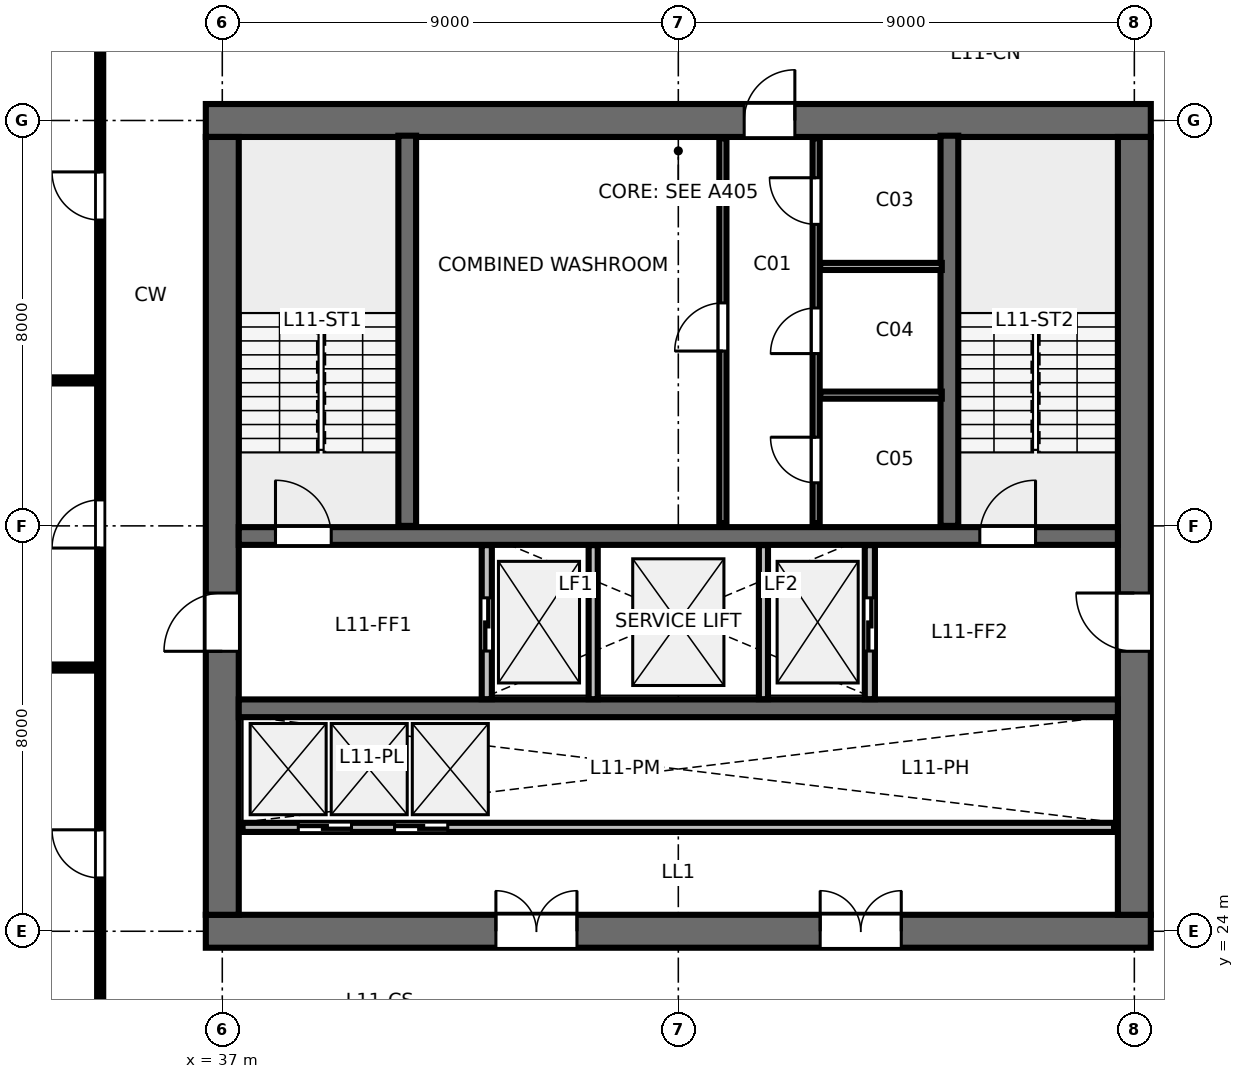
"""IFC4 building model, lengths in metres.
Left out: names, types, materials, properties, quantities, classifications, styles, units other than length and angle.
Written with IfcOpenShell. Run it as: python <this file> out.ifc"""

import sys

from ifc_helpers import new_model, si_unit, direction, frame, frame_2d, origin, place, context, subcontext, project, spatial, rectangle, extrude, element, fill, save


model = new_model("IFC4")
c1 = context("Model", 3, precision=1e-05, world=origin(), true_north=direction((0.0, 1.0)))
c2 = subcontext(c1, "Body", "Model", "MODEL_VIEW")
j1 = project(units=[si_unit("LENGTHUNIT", "METRE"), si_unit("PLANEANGLEUNIT", "RADIAN")], contexts=[c1])
p1 = place(None, origin())
s1 = spatial("IfcSite", under=j1, at=p1, CompositionType="ELEMENT")
p2 = place(p1, origin())
s2 = spatial("IfcBuilding", under=s1, at=p2, CompositionType="ELEMENT")
p3 = place(p2, frame((0.0, 0.0, 46.0)))
s3 = spatial("IfcBuildingStorey", under=s2, at=p3, CompositionType="ELEMENT", Elevation=46.0)
p4 = place(p3, frame((36.675, 24.0, 0.0), z_axis=(0.0, 0.0, 1.0), x_axis=(1.0, 0.0, 0.0)))
e1 = element("IfcWall", 1, at=p4, inside=s3, PredefinedType="SHEAR", context=c2, shape_type="SweptSolid", body=[
    extrude(rectangle(XDim=18.65, YDim=0.65, at=frame_2d((9.325, 0.0))), origin(), (0.0, 0.0, 1.0), 3.36),
])
p5 = place(p4, frame((5.725, 0.0, 0.0)))
e2 = element("IfcOpeningElement", 2, at=p5, cuts=e1, PredefinedType="OPENING", context=c2, shape_type="SweptSolid", body=[
    extrude(rectangle(XDim=1.6, YDim=2.15, at=frame_2d((0.8, 1.075))), frame((0.0, 0.335, 0.0), z_axis=(0.0, -1.0, 0.0), x_axis=(1.0, 0.0, 0.0)), (0.0, 0.0, 1.0), 0.67),
])
p6 = place(p4, frame((12.125, 0.0, 0.0)))
e3 = element("IfcOpeningElement", 3, at=p6, cuts=e1, PredefinedType="OPENING", context=c2, shape_type="SweptSolid", body=[
    extrude(rectangle(XDim=1.6, YDim=2.15, at=frame_2d((0.8, 1.075))), frame((0.0, 0.335, 0.0), z_axis=(0.0, -1.0, 0.0), x_axis=(1.0, 0.0, 0.0)), (0.0, 0.0, 1.0), 0.67),
])
p7 = place(p3, frame((36.675, 40.0, 0.0), z_axis=(0.0, 0.0, 1.0), x_axis=(1.0, 0.0, 0.0)))
e4 = element("IfcWall", 4, at=p7, inside=s3, PredefinedType="SHEAR", context=c2, shape_type="SweptSolid", body=[
    extrude(rectangle(XDim=18.65, YDim=0.65, at=frame_2d((9.325, 0.0))), origin(), (0.0, 0.0, 1.0), 3.36),
])
p8 = place(p7, frame((10.625, 0.0, 0.0)))
e5 = element("IfcOpeningElement", 5, at=p8, cuts=e4, PredefinedType="OPENING", context=c2, shape_type="SweptSolid", body=[
    extrude(rectangle(XDim=1.0, YDim=2.15, at=frame_2d((0.5, 1.075))), frame((0.0, 0.335, 0.0), z_axis=(0.0, -1.0, 0.0), x_axis=(1.0, 0.0, 0.0)), (0.0, 0.0, 1.0), 0.67),
])
p9 = place(p3, frame((37.0, 24.325, 0.0), z_axis=(0.0, 0.0, 1.0), x_axis=(0.0, 1.0, 0.0)))
e6 = element("IfcWall", 6, at=p9, inside=s3, PredefinedType="SHEAR", context=c2, shape_type="SweptSolid", body=[
    extrude(rectangle(XDim=15.35, YDim=0.65, at=frame_2d((7.675, 0.0))), origin(), (0.0, 0.0, 1.0), 3.36),
])
p10 = place(p9, frame((5.2, 0.0, 0.0)))
e7 = element("IfcOpeningElement", 7, at=p10, cuts=e6, PredefinedType="OPENING", context=c2, shape_type="SweptSolid", body=[
    extrude(rectangle(XDim=1.15, YDim=2.15, at=frame_2d((0.575, 1.075))), frame((0.0, 0.335, 0.0), z_axis=(0.0, -1.0, 0.0), x_axis=(1.0, 0.0, 0.0)), (0.0, 0.0, 1.0), 0.67),
])
p11 = place(p3, frame((55.0, 24.325, 0.0), z_axis=(0.0, 0.0, 1.0), x_axis=(0.0, 1.0, 0.0)))
e8 = element("IfcWall", 8, at=p11, inside=s3, PredefinedType="SHEAR", context=c2, shape_type="SweptSolid", body=[
    extrude(rectangle(XDim=15.35, YDim=0.65, at=frame_2d((7.675, 0.0))), origin(), (0.0, 0.0, 1.0), 3.36),
])
p12 = place(p11, frame((5.2, 0.0, 0.0)))
e9 = element("IfcOpeningElement", 9, at=p12, cuts=e8, PredefinedType="OPENING", context=c2, shape_type="SweptSolid", body=[
    extrude(rectangle(XDim=1.15, YDim=2.15, at=frame_2d((0.575, 1.075))), frame((0.0, 0.335, 0.0), z_axis=(0.0, -1.0, 0.0), x_axis=(1.0, 0.0, 0.0)), (0.0, 0.0, 1.0), 0.67),
])
p13 = place(p3, frame((37.325, 31.8, 0.0), z_axis=(0.0, 0.0, 1.0), x_axis=(1.0, 0.0, 0.0)))
e10 = element("IfcWall", 10, at=p13, inside=s3, PredefinedType="SHEAR", context=c2, shape_type="SweptSolid", body=[
    extrude(rectangle(XDim=17.35, YDim=0.35, at=frame_2d((8.675, 0.0))), origin(), (0.0, 0.0, 1.0), 3.36),
])
p14 = place(p13, frame((0.725, 0.0, 0.0)))
e11 = element("IfcOpeningElement", 11, at=p14, cuts=e10, PredefinedType="OPENING", context=c2, shape_type="SweptSolid", body=[
    extrude(rectangle(XDim=1.1, YDim=2.15, at=frame_2d((0.55, 1.075))), frame((0.0, 0.185, 0.0), z_axis=(0.0, -1.0, 0.0), x_axis=(1.0, 0.0, 0.0)), (0.0, 0.0, 1.0), 0.37),
])
p15 = place(p13, frame((14.625, 0.0, 0.0)))
e12 = element("IfcOpeningElement", 12, at=p15, cuts=e10, PredefinedType="OPENING", context=c2, shape_type="SweptSolid", body=[
    extrude(rectangle(XDim=1.1, YDim=2.15, at=frame_2d((0.55, 1.075))), frame((0.0, 0.185, 0.0), z_axis=(0.0, -1.0, 0.0), x_axis=(1.0, 0.0, 0.0)), (0.0, 0.0, 1.0), 0.37),
])
p16 = place(p3, frame((37.325, 28.4, 0.0), z_axis=(0.0, 0.0, 1.0), x_axis=(1.0, 0.0, 0.0)))
e13 = element("IfcWall", 13, at=p16, inside=s3, PredefinedType="SHEAR", context=c2, shape_type="SweptSolid", body=[
    extrude(rectangle(XDim=17.35, YDim=0.35, at=frame_2d((8.675, 0.0))), origin(), (0.0, 0.0, 1.0), 3.36),
])
for number, where, z_axis, x_axis in (
    (14, (40.65, 32.0, 0.0), (0.0, 0.0, 1.0), (0.0, 1.0, 0.0)),
    (15, (51.35, 32.0, 0.0), (0.0, 0.0, 1.0), (0.0, 1.0, 0.0)),
):
    element("IfcWall", number, at=place(p3, frame(where, z_axis=z_axis, x_axis=x_axis)), inside=s3, PredefinedType="SHEAR", context=c2, shape_type="SweptSolid", body=[
        extrude(rectangle(XDim=7.7, YDim=0.35, at=frame_2d((3.85, 0.0))), origin(), (0.0, 0.0, 1.0), 3.6),
    ])
p17 = place(p3, frame((46.88, 32.05, 0.0), z_axis=(0.0, 0.0, 1.0), x_axis=(0.0, 1.0, 0.0)))
e16 = element("IfcWall", 16, at=p17, inside=s3, PredefinedType="PARTITIONING", context=c2, shape_type="SweptSolid", body=[
    extrude(rectangle(XDim=7.6, YDim=0.14, at=frame_2d((3.8, 0.0))), origin(), (0.0, 0.0, 1.0), 3.15),
])
p18 = place(p17, frame((3.4, 0.0, 0.0)))
e17 = element("IfcOpeningElement", 17, at=p18, cuts=e16, PredefinedType="OPENING", context=c2, shape_type="SweptSolid", body=[
    extrude(rectangle(XDim=0.95, YDim=2.15, at=frame_2d((0.475, 1.075))), frame((0.0, 0.08, 0.0), z_axis=(0.0, -1.0, 0.0), x_axis=(1.0, 0.0, 0.0)), (0.0, 0.0, 1.0), 0.16),
])
p19 = place(p3, frame((48.72, 32.05, 0.0), z_axis=(0.0, 0.0, 1.0), x_axis=(0.0, 1.0, 0.0)))
e18 = element("IfcWall", 18, at=p19, inside=s3, PredefinedType="PARTITIONING", context=c2, shape_type="SweptSolid", body=[
    extrude(rectangle(XDim=7.6, YDim=0.14, at=frame_2d((3.8, 0.0))), origin(), (0.0, 0.0, 1.0), 3.15),
])
p20 = place(p19, frame((0.8, 0.0, 0.0)))
e19 = element("IfcOpeningElement", 19, at=p20, cuts=e18, PredefinedType="OPENING", context=c2, shape_type="SweptSolid", body=[
    extrude(rectangle(XDim=0.9, YDim=2.15, at=frame_2d((0.45, 1.075))), frame((0.0, 0.08, 0.0), z_axis=(0.0, -1.0, 0.0), x_axis=(1.0, 0.0, 0.0)), (0.0, 0.0, 1.0), 0.16),
])
p21 = place(p19, frame((3.35, 0.0, 0.0)))
e20 = element("IfcOpeningElement", 20, at=p21, cuts=e18, PredefinedType="OPENING", context=c2, shape_type="SweptSolid", body=[
    extrude(rectangle(XDim=0.9, YDim=2.15, at=frame_2d((0.45, 1.075))), frame((0.0, 0.08, 0.0), z_axis=(0.0, -1.0, 0.0), x_axis=(1.0, 0.0, 0.0)), (0.0, 0.0, 1.0), 0.16),
])
p22 = place(p19, frame((5.9, 0.0, 0.0)))
e21 = element("IfcOpeningElement", 21, at=p22, cuts=e18, PredefinedType="OPENING", context=c2, shape_type="SweptSolid", body=[
    extrude(rectangle(XDim=0.92, YDim=2.15, at=frame_2d((0.46, 1.075))), frame((0.0, 0.08, 0.0), z_axis=(0.0, -1.0, 0.0), x_axis=(1.0, 0.0, 0.0)), (0.0, 0.0, 1.0), 0.16),
])
for number, where, z_axis, x_axis in (
    (22, (48.8, 34.58, 0.0), (0.0, 0.0, 1.0), (1.0, 0.0, 0.0)),
    (23, (48.8, 37.12, 0.0), (0.0, 0.0, 1.0), (1.0, 0.0, 0.0)),
):
    element("IfcWall", number, at=place(p3, frame(where, z_axis=z_axis, x_axis=x_axis)), inside=s3, PredefinedType="PARTITIONING", context=c2, shape_type="SweptSolid", body=[
        extrude(rectangle(XDim=2.4, YDim=0.14, at=frame_2d((1.2, 0.0))), origin(), (0.0, 0.0, 1.0), 3.15),
    ])
p23 = place(p3, frame((42.22, 28.58, 0.0), z_axis=(0.0, 0.0, 1.0), x_axis=(0.0, 1.0, 0.0)))
e24 = element("IfcWall", 24, at=p23, inside=s3, PredefinedType="PARTITIONING", context=c2, shape_type="SweptSolid", body=[
    extrude(rectangle(XDim=3.04, YDim=0.2, at=frame_2d((1.52, 0.0))), origin(), (0.0, 0.0, 1.0), 3.15),
])
p24 = place(p23, frame((0.95, 0.0, 0.0)))
e25 = element("IfcOpeningElement", 25, at=p24, cuts=e24, PredefinedType="OPENING", context=c2, shape_type="SweptSolid", body=[
    extrude(rectangle(XDim=1.05, YDim=2.15, at=frame_2d((0.525, 1.075))), frame((0.0, 0.11, 0.0), z_axis=(0.0, -1.0, 0.0), x_axis=(1.0, 0.0, 0.0)), (0.0, 0.0, 1.0), 0.22),
])
p25 = place(p3, frame((49.78, 28.58, 0.0), z_axis=(0.0, 0.0, 1.0), x_axis=(0.0, 1.0, 0.0)))
e26 = element("IfcWall", 26, at=p25, inside=s3, PredefinedType="PARTITIONING", context=c2, shape_type="SweptSolid", body=[
    extrude(rectangle(XDim=3.04, YDim=0.2, at=frame_2d((1.52, 0.0))), origin(), (0.0, 0.0, 1.0), 3.15),
])
p26 = place(p25, frame((0.95, 0.0, 0.0)))
e27 = element("IfcOpeningElement", 27, at=p26, cuts=e26, PredefinedType="OPENING", context=c2, shape_type="SweptSolid", body=[
    extrude(rectangle(XDim=1.05, YDim=2.15, at=frame_2d((0.525, 1.075))), frame((0.0, 0.11, 0.0), z_axis=(0.0, -1.0, 0.0), x_axis=(1.0, 0.0, 0.0)), (0.0, 0.0, 1.0), 0.22),
])
for number, where, z_axis, x_axis in (
    (28, (44.32, 28.58, 0.0), (0.0, 0.0, 1.0), (0.0, 1.0, 0.0)),
    (29, (47.68, 28.58, 0.0), (0.0, 0.0, 1.0), (0.0, 1.0, 0.0)),
):
    element("IfcWall", number, at=place(p3, frame(where, z_axis=z_axis, x_axis=x_axis)), inside=s3, PredefinedType="PARTITIONING", context=c2, shape_type="SweptSolid", body=[
        extrude(rectangle(XDim=3.04, YDim=0.18, at=frame_2d((1.52, 0.0))), origin(), (0.0, 0.0, 1.0), 3.15),
    ])
p27 = place(p3, frame((37.4, 26.05, 0.0), z_axis=(0.0, 0.0, 1.0), x_axis=(1.0, 0.0, 0.0)))
e30 = element("IfcWall", 30, at=p27, inside=s3, PredefinedType="PARTITIONING", context=c2, shape_type="SweptSolid", body=[
    extrude(rectangle(XDim=17.2, YDim=0.18, at=frame_2d((8.6, 0.0))), origin(), (0.0, 0.0, 1.0), 3.15),
])
p28 = place(p27, frame((1.1, 0.0, 0.0)))
e31 = element("IfcOpeningElement", 31, at=p28, cuts=e30, PredefinedType="OPENING", context=c2, shape_type="SweptSolid", body=[
    extrude(rectangle(XDim=1.05, YDim=2.15, at=frame_2d((0.525, 1.075))), frame((0.0, 0.1, 0.0), z_axis=(0.0, -1.0, 0.0), x_axis=(1.0, 0.0, 0.0)), (0.0, 0.0, 1.0), 0.2),
])
p29 = place(p27, frame((3.0, 0.0, 0.0)))
e32 = element("IfcOpeningElement", 32, at=p29, cuts=e30, PredefinedType="OPENING", context=c2, shape_type="SweptSolid", body=[
    extrude(rectangle(XDim=1.05, YDim=2.15, at=frame_2d((0.525, 1.075))), frame((0.0, 0.1, 0.0), z_axis=(0.0, -1.0, 0.0), x_axis=(1.0, 0.0, 0.0)), (0.0, 0.0, 1.0), 0.2),
])
p30 = place(p3, frame((34.59, 29.204, 0.0), z_axis=(0.0, 0.0, 1.0), x_axis=(-1.0, 0.0, 0.0)))
e33 = element("IfcWall", 33, at=p30, inside=s3, PredefinedType="PARTITIONING", context=c2, shape_type="SweptSolid", body=[
    extrude(rectangle(XDim=12.36, YDim=0.12, at=frame_2d((6.18, 0.0))), origin(), (0.0, 0.0, 1.0), 2.43),
])
p31 = place(p30, frame((1.4, 0.0, 0.0)))
e34 = element("IfcOpeningElement", 34, at=p31, cuts=e33, PredefinedType="OPENING", context=c2, shape_type="SweptSolid", body=[
    extrude(rectangle(XDim=0.9, YDim=2.15, at=frame_2d((0.45, 1.075))), frame((0.0, 0.07, 0.0), z_axis=(0.0, -1.0, 0.0), x_axis=(1.0, 0.0, 0.0)), (0.0, 0.0, 1.0), 0.14),
])
p32 = place(p3, frame((34.59, 34.871, 0.0), z_axis=(0.0, 0.0, 1.0), x_axis=(-1.0, 0.0, 0.0)))
e35 = element("IfcWall", 35, at=p32, inside=s3, PredefinedType="PARTITIONING", context=c2, shape_type="SweptSolid", body=[
    extrude(rectangle(XDim=12.36, YDim=0.12, at=frame_2d((6.18, 0.0))), origin(), (0.0, 0.0, 1.0), 2.43),
])
p33 = place(p32, frame((1.4, 0.0, 0.0)))
e36 = element("IfcOpeningElement", 36, at=p33, cuts=e35, PredefinedType="OPENING", context=c2, shape_type="SweptSolid", body=[
    extrude(rectangle(XDim=0.9, YDim=2.15, at=frame_2d((0.45, 1.075))), frame((0.0, 0.07, 0.0), z_axis=(0.0, -1.0, 0.0), x_axis=(1.0, 0.0, 0.0)), (0.0, 0.0, 1.0), 0.14),
])
p34 = place(p3, frame((34.59, 21.65, 0.0), z_axis=(0.0, 0.0, 1.0), x_axis=(0.0, 1.0, 0.0)))
e37 = element("IfcWall", 37, at=p34, inside=s3, PredefinedType="PARTITIONING", context=c2, shape_type="SweptSolid", body=[
    extrude(rectangle(XDim=20.7, YDim=0.12, at=frame_2d((10.35, 0.0))), origin(), (0.0, 0.0, 1.0), 2.43),
])
p35 = place(p34, frame((3.402, 0.0, 0.0)))
e38 = element("IfcOpeningElement", 38, at=p35, cuts=e37, PredefinedType="OPENING", context=c2, shape_type="SweptSolid", body=[
    extrude(rectangle(XDim=0.95, YDim=2.15, at=frame_2d((0.475, 1.075))), frame((0.0, 0.07, 0.0), z_axis=(0.0, -1.0, 0.0), x_axis=(1.0, 0.0, 0.0)), (0.0, 0.0, 1.0), 0.14),
])
p36 = place(p34, frame((9.912, 0.0, 0.0)))
e39 = element("IfcOpeningElement", 39, at=p36, cuts=e37, PredefinedType="OPENING", context=c2, shape_type="SweptSolid", body=[
    extrude(rectangle(XDim=0.95, YDim=2.15, at=frame_2d((0.475, 1.075))), frame((0.0, 0.07, 0.0), z_axis=(0.0, -1.0, 0.0), x_axis=(1.0, 0.0, 0.0)), (0.0, 0.0, 1.0), 0.14),
])
p37 = place(p34, frame((16.385, 0.0, 0.0)))
e40 = element("IfcOpeningElement", 40, at=p37, cuts=e37, PredefinedType="OPENING", context=c2, shape_type="SweptSolid", body=[
    extrude(rectangle(XDim=0.95, YDim=2.15, at=frame_2d((0.475, 1.075))), frame((0.0, 0.07, 0.0), z_axis=(0.0, -1.0, 0.0), x_axis=(1.0, 0.0, 0.0)), (0.0, 0.0, 1.0), 0.14),
])
p38 = place(p14, origin())
e41 = element("IfcDoor", 41, at=p38, inside=s3, OperationType="SINGLE_SWING_LEFT", PredefinedType="DOOR", context=c2, shape_type="SweptSolid", body=[
    extrude(rectangle(XDim=1.1, YDim=2.15, at=frame_2d((0.55, 1.075))), frame((0.0, 0.025, 0.0), z_axis=(0.0, -1.0, 0.0), x_axis=(1.0, 0.0, 0.0)), (0.0, 0.0, 1.0), 0.05),
])
fill(e11, e41)
p39 = place(p15, origin())
e42 = element("IfcDoor", 42, at=p39, inside=s3, OperationType="SINGLE_SWING_RIGHT", PredefinedType="DOOR", context=c2, shape_type="SweptSolid", body=[
    extrude(rectangle(XDim=1.1, YDim=2.15, at=frame_2d((0.55, 1.075))), frame((0.0, 0.025, 0.0), z_axis=(0.0, -1.0, 0.0), x_axis=(1.0, 0.0, 0.0)), (0.0, 0.0, 1.0), 0.05),
])
fill(e12, e42)
p40 = place(p8, origin())
e43 = element("IfcDoor", 43, at=p40, inside=s3, OperationType="SINGLE_SWING_RIGHT", PredefinedType="DOOR", context=c2, shape_type="SweptSolid", body=[
    extrude(rectangle(XDim=1.0, YDim=2.15, at=frame_2d((0.5, 1.075))), frame((0.0, 0.025, 0.0), z_axis=(0.0, -1.0, 0.0), x_axis=(1.0, 0.0, 0.0)), (0.0, 0.0, 1.0), 0.05),
])
fill(e5, e43)
p41 = place(p10, origin())
e44 = element("IfcDoor", 44, at=p41, inside=s3, OperationType="SINGLE_SWING_LEFT", PredefinedType="DOOR", context=c2, shape_type="SweptSolid", body=[
    extrude(rectangle(XDim=1.15, YDim=2.15, at=frame_2d((0.575, 1.075))), frame((0.0, 0.025, 0.0), z_axis=(0.0, -1.0, 0.0), x_axis=(1.0, 0.0, 0.0)), (0.0, 0.0, 1.0), 0.05),
])
fill(e7, e44)
p42 = place(p12, origin())
e45 = element("IfcDoor", 45, at=p42, inside=s3, OperationType="SINGLE_SWING_RIGHT", PredefinedType="DOOR", context=c2, shape_type="SweptSolid", body=[
    extrude(rectangle(XDim=1.15, YDim=2.15, at=frame_2d((0.575, 1.075))), frame((0.0, 0.025, 0.0), z_axis=(0.0, -1.0, 0.0), x_axis=(1.0, 0.0, 0.0)), (0.0, 0.0, 1.0), 0.05),
])
fill(e9, e45)
p43 = place(p5, origin())
e46 = element("IfcDoor", 46, at=p43, inside=s3, OperationType="DOUBLE_DOOR_SINGLE_SWING", PredefinedType="DOOR", context=c2, shape_type="SweptSolid", body=[
    extrude(rectangle(XDim=1.6, YDim=2.15, at=frame_2d((0.8, 1.075))), frame((0.0, 0.025, 0.0), z_axis=(0.0, -1.0, 0.0), x_axis=(1.0, 0.0, 0.0)), (0.0, 0.0, 1.0), 0.05),
])
fill(e2, e46)
p44 = place(p6, origin())
e47 = element("IfcDoor", 47, at=p44, inside=s3, OperationType="DOUBLE_DOOR_SINGLE_SWING", PredefinedType="DOOR", context=c2, shape_type="SweptSolid", body=[
    extrude(rectangle(XDim=1.6, YDim=2.15, at=frame_2d((0.8, 1.075))), frame((0.0, 0.025, 0.0), z_axis=(0.0, -1.0, 0.0), x_axis=(1.0, 0.0, 0.0)), (0.0, 0.0, 1.0), 0.05),
])
fill(e3, e47)
p45 = place(p18, origin())
e48 = element("IfcDoor", 48, at=p45, inside=s3, OperationType="SINGLE_SWING_LEFT", PredefinedType="DOOR", context=c2, shape_type="SweptSolid", body=[
    extrude(rectangle(XDim=0.95, YDim=2.15, at=frame_2d((0.475, 1.075))), frame((0.0, 0.025, 0.0), z_axis=(0.0, -1.0, 0.0), x_axis=(1.0, 0.0, 0.0)), (0.0, 0.0, 1.0), 0.05),
])
fill(e17, e48)
p46 = place(p20, origin())
e49 = element("IfcDoor", 49, at=p46, inside=s3, OperationType="SINGLE_SWING_RIGHT", PredefinedType="DOOR", context=c2, shape_type="SweptSolid", body=[
    extrude(rectangle(XDim=0.9, YDim=2.15, at=frame_2d((0.45, 1.075))), frame((0.0, 0.025, 0.0), z_axis=(0.0, -1.0, 0.0), x_axis=(1.0, 0.0, 0.0)), (0.0, 0.0, 1.0), 0.05),
])
fill(e19, e49)
p47 = place(p21, origin())
e50 = element("IfcDoor", 50, at=p47, inside=s3, OperationType="SINGLE_SWING_LEFT", PredefinedType="DOOR", context=c2, shape_type="SweptSolid", body=[
    extrude(rectangle(XDim=0.9, YDim=2.15, at=frame_2d((0.45, 1.075))), frame((0.0, 0.025, 0.0), z_axis=(0.0, -1.0, 0.0), x_axis=(1.0, 0.0, 0.0)), (0.0, 0.0, 1.0), 0.05),
])
fill(e20, e50)
p48 = place(p22, origin())
e51 = element("IfcDoor", 51, at=p48, inside=s3, OperationType="SINGLE_SWING_RIGHT", PredefinedType="DOOR", context=c2, shape_type="SweptSolid", body=[
    extrude(rectangle(XDim=0.92, YDim=2.15, at=frame_2d((0.46, 1.075))), frame((0.0, 0.025, 0.0), z_axis=(0.0, -1.0, 0.0), x_axis=(1.0, 0.0, 0.0)), (0.0, 0.0, 1.0), 0.05),
])
fill(e21, e51)
p49 = place(p24, origin())
e52 = element("IfcDoor", 52, at=p49, inside=s3, OperationType="SLIDING_TO_LEFT", PredefinedType="DOOR", context=c2, shape_type="SweptSolid", body=[
    extrude(rectangle(XDim=1.05, YDim=2.15, at=frame_2d((0.525, 1.075))), frame((0.0, 0.025, 0.0), z_axis=(0.0, -1.0, 0.0), x_axis=(1.0, 0.0, 0.0)), (0.0, 0.0, 1.0), 0.05),
])
fill(e25, e52)
p50 = place(p26, origin())
e53 = element("IfcDoor", 53, at=p50, inside=s3, OperationType="SLIDING_TO_RIGHT", PredefinedType="DOOR", context=c2, shape_type="SweptSolid", body=[
    extrude(rectangle(XDim=1.05, YDim=2.15, at=frame_2d((0.525, 1.075))), frame((0.0, 0.025, 0.0), z_axis=(0.0, -1.0, 0.0), x_axis=(1.0, 0.0, 0.0)), (0.0, 0.0, 1.0), 0.05),
])
fill(e27, e53)
p51 = place(p28, origin())
e54 = element("IfcDoor", 54, at=p51, inside=s3, OperationType="SLIDING_TO_LEFT", PredefinedType="DOOR", context=c2, shape_type="SweptSolid", body=[
    extrude(rectangle(XDim=1.05, YDim=2.15, at=frame_2d((0.525, 1.075))), frame((0.0, 0.025, 0.0), z_axis=(0.0, -1.0, 0.0), x_axis=(1.0, 0.0, 0.0)), (0.0, 0.0, 1.0), 0.05),
])
fill(e31, e54)
p52 = place(p29, origin())
e55 = element("IfcDoor", 55, at=p52, inside=s3, OperationType="SLIDING_TO_RIGHT", PredefinedType="DOOR", context=c2, shape_type="SweptSolid", body=[
    extrude(rectangle(XDim=1.05, YDim=2.15, at=frame_2d((0.525, 1.075))), frame((0.0, 0.025, 0.0), z_axis=(0.0, -1.0, 0.0), x_axis=(1.0, 0.0, 0.0)), (0.0, 0.0, 1.0), 0.05),
])
fill(e32, e55)
p53 = place(p35, origin())
e56 = element("IfcDoor", 56, at=p53, inside=s3, OperationType="SINGLE_SWING_RIGHT", PredefinedType="DOOR", context=c2, shape_type="SweptSolid", body=[
    extrude(rectangle(XDim=0.95, YDim=2.15, at=frame_2d((0.475, 1.075))), frame((0.0, 0.025, 0.0), z_axis=(0.0, -1.0, 0.0), x_axis=(1.0, 0.0, 0.0)), (0.0, 0.0, 1.0), 0.05),
])
fill(e38, e56)
p54 = place(p36, origin())
e57 = element("IfcDoor", 57, at=p54, inside=s3, OperationType="SINGLE_SWING_LEFT", PredefinedType="DOOR", context=c2, shape_type="SweptSolid", body=[
    extrude(rectangle(XDim=0.95, YDim=2.15, at=frame_2d((0.475, 1.075))), frame((0.0, 0.025, 0.0), z_axis=(0.0, -1.0, 0.0), x_axis=(1.0, 0.0, 0.0)), (0.0, 0.0, 1.0), 0.05),
])
fill(e39, e57)
p55 = place(p37, origin())
e58 = element("IfcDoor", 58, at=p55, inside=s3, OperationType="SINGLE_SWING_RIGHT", PredefinedType="DOOR", context=c2, shape_type="SweptSolid", body=[
    extrude(rectangle(XDim=0.95, YDim=2.15, at=frame_2d((0.475, 1.075))), frame((0.0, 0.025, 0.0), z_axis=(0.0, -1.0, 0.0), x_axis=(1.0, 0.0, 0.0)), (0.0, 0.0, 1.0), 0.05),
])
fill(e40, e58)
save(model, sys.argv[1])
